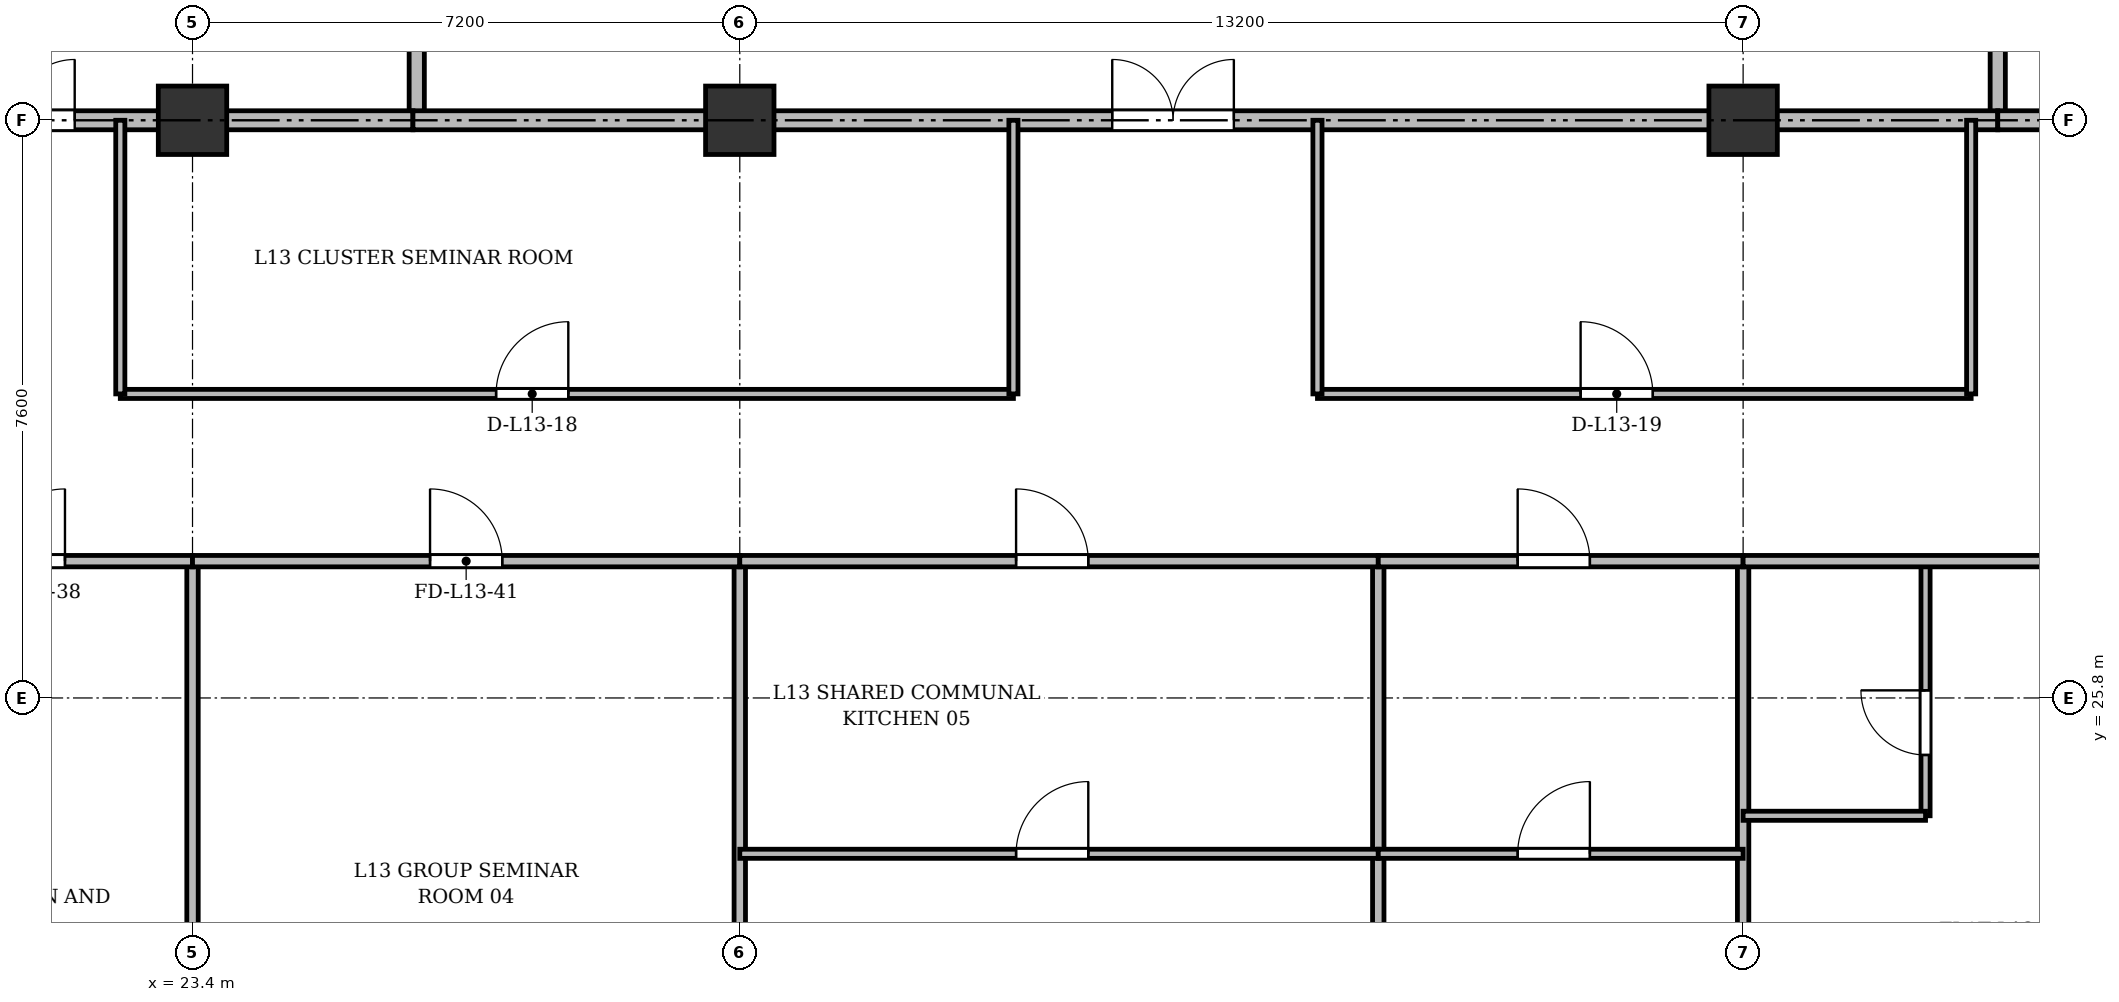
"""IFC4 building model, lengths in metres.
Left out: names, types, materials, properties, quantities, classifications, styles, units other than length and angle.
Written with IfcOpenShell. Run it as: python <this file> out.ifc"""

import sys

from ifc_helpers import new_model, si_unit, direction, frame, frame_2d, origin, origin_2d, place, context, subcontext, project, spatial, rectangle, extrude, source, transform, mapped, element, fill, save


model = new_model("IFC4")
c1 = context("Model", 3, precision=1e-05, world=origin(), true_north=direction((0.0, 1.0)))
c2 = subcontext(c1, "Body", "Model", "MODEL_VIEW")
j1 = project(units=[si_unit("LENGTHUNIT", "METRE"), si_unit("PLANEANGLEUNIT", "RADIAN")], contexts=[c1])
p1 = place(None, origin())
s1 = spatial("IfcSite", under=j1, at=p1, CompositionType="ELEMENT")
p2 = place(p1, origin())
s2 = spatial("IfcBuilding", under=s1, at=p2, CompositionType="ELEMENT")
p3 = place(p2, frame((0.0, 0.0, 52.3)))
s3 = spatial("IfcBuildingStorey", under=s2, at=p3, CompositionType="ELEMENT", Elevation=52.3)
m1 = source(origin(), c2, "Body", "SweptSolid", [
    extrude(rectangle(XDim=0.9, YDim=0.9, at=origin_2d()), origin(), (0.0, 0.0, 1.0), 3.6),
])
for number, where, z_axis, x_axis in (
    (1, (23.4, 33.4, 0.0), (0.0, 0.0, 1.0), (1.0, 0.0, 0.0)),
    (2, (30.6, 33.4, 0.0), (0.0, 0.0, 1.0), (1.0, 0.0, 0.0)),
    (3, (43.8, 33.4, 0.0), (0.0, 0.0, 1.0), (1.0, 0.0, 0.0)),
):
    element("IfcColumn", number, at=place(p3, frame(where, z_axis=z_axis, x_axis=x_axis)), inside=s3, PredefinedType="COLUMN", context=c2, shape_type="MappedRepresentation", body=[
        mapped(m1, transform((0.0, 0.0, 0.0), x_axis=(1.0, 0.0, 0.0), y_axis=(0.0, 1.0, 0.0), z_axis=(0.0, 0.0, 1.0), scale=1.0)),
    ])
p4 = place(p3, frame((26.35, 33.4, 0.0), z_axis=(0.0, 0.0, 1.0), x_axis=(0.0, 1.0, 0.0)))
e4 = element("IfcWall", 4, at=p4, inside=s3, PredefinedType="SOLIDWALL", context=c2, shape_type="SweptSolid", body=[
    extrude(rectangle(XDim=11.3, YDim=0.2, at=frame_2d((5.65, 0.0))), origin(), (0.0, 0.0, 1.0), 2.69),
])
p5 = place(p3, frame((19.5, 33.4, 0.0), z_axis=(0.0, 0.0, 1.0), x_axis=(1.0, 0.0, 0.0)))
e5 = element("IfcWall", 5, at=p5, inside=s3, PredefinedType="PARTITIONING", context=c2, shape_type="SweptSolid", body=[
    extrude(rectangle(XDim=6.8, YDim=0.25, at=frame_2d((3.4, 0.0))), origin(), (0.0, 0.0, 1.0), 2.69),
])
p6 = place(p5, frame((0.75, 0.0, 0.0)))
e6 = element("IfcOpeningElement", 6, at=p6, cuts=e5, PredefinedType="OPENING", context=c2, shape_type="SweptSolid", body=[
    extrude(rectangle(XDim=1.6, YDim=2.2, at=frame_2d((0.8, 1.1))), frame((0.0, 0.135, 0.0), z_axis=(0.0, -1.0, 0.0), x_axis=(1.0, 0.0, 0.0)), (0.0, 0.0, 1.0), 0.27),
])
p7 = place(p3, frame((47.15, 33.4, 0.0), z_axis=(0.0, 0.0, 1.0), x_axis=(0.0, 1.0, 0.0)))
e7 = element("IfcWall", 7, at=p7, inside=s3, PredefinedType="SOLIDWALL", context=c2, shape_type="SweptSolid", body=[
    extrude(rectangle(XDim=11.3, YDim=0.2, at=frame_2d((5.65, 0.0))), origin(), (0.0, 0.0, 1.0), 2.69),
])
p8 = place(p3, frame((26.3, 33.4, 0.0), z_axis=(0.0, 0.0, 1.0), x_axis=(1.0, 0.0, 0.0)))
e8 = element("IfcWall", 8, at=p8, inside=s3, PredefinedType="PARTITIONING", context=c2, shape_type="SweptSolid", body=[
    extrude(rectangle(XDim=20.85, YDim=0.25, at=frame_2d((10.425, 0.0))), origin(), (0.0, 0.0, 1.0), 2.69),
])
p9 = place(p8, frame((9.2, 0.0, 0.0)))
e9 = element("IfcOpeningElement", 9, at=p9, cuts=e8, PredefinedType="OPENING", context=c2, shape_type="SweptSolid", body=[
    extrude(rectangle(XDim=1.6, YDim=2.2, at=frame_2d((0.8, 1.1))), frame((0.0, 0.135, 0.0), z_axis=(0.0, -1.0, 0.0), x_axis=(1.0, 0.0, 0.0)), (0.0, 0.0, 1.0), 0.27),
])
p10 = place(p3, frame((47.15, 33.4, 0.0), z_axis=(0.0, 0.0, 1.0), x_axis=(1.0, 0.0, 0.0)))
e10 = element("IfcWall", 10, at=p10, inside=s3, PredefinedType="PARTITIONING", context=c2, shape_type="SweptSolid", body=[
    extrude(rectangle(XDim=11.15, YDim=0.25, at=frame_2d((5.575, 0.0))), origin(), (0.0, 0.0, 1.0), 2.69),
])
p11 = place(p10, frame((0.7, 0.0, 0.0)))
e11 = element("IfcOpeningElement", 11, at=p11, cuts=e10, PredefinedType="OPENING", context=c2, shape_type="SweptSolid", body=[
    extrude(rectangle(XDim=0.95, YDim=2.15, at=frame_2d((0.475, 1.075))), frame((0.0, 0.135, 0.0), z_axis=(0.0, -1.0, 0.0), x_axis=(1.0, 0.0, 0.0)), (0.0, 0.0, 1.0), 0.27),
])
p12 = place(p10, frame((6.0, 0.0, 0.0)))
e12 = element("IfcOpeningElement", 12, at=p12, cuts=e10, PredefinedType="OPENING", context=c2, shape_type="SweptSolid", body=[
    extrude(rectangle(XDim=1.2, YDim=2.15, at=frame_2d((0.6, 1.075))), frame((0.0, 0.135, 0.0), z_axis=(0.0, -1.0, 0.0), x_axis=(1.0, 0.0, 0.0)), (0.0, 0.0, 1.0), 0.27),
])
p13 = place(p3, frame((22.45, 29.8, 0.0), z_axis=(0.0, 0.0, 1.0), x_axis=(1.0, 0.0, 0.0)))
e13 = element("IfcWall", 13, at=p13, inside=s3, PredefinedType="PARTITIONING", context=c2, shape_type="SweptSolid", body=[
    extrude(rectangle(XDim=11.75, YDim=0.12, at=frame_2d((5.875, 0.0))), origin(), (0.0, 0.0, 1.0), 2.752),
])
p14 = place(p13, frame((4.944, 0.0, 0.0)))
e14 = element("IfcOpeningElement", 14, at=p14, cuts=e13, PredefinedType="OPENING", context=c2, shape_type="SweptSolid", body=[
    extrude(rectangle(XDim=0.95, YDim=2.15, at=frame_2d((0.475, 1.075))), frame((0.0, 0.07, 0.0), z_axis=(0.0, -1.0, 0.0), x_axis=(1.0, 0.0, 0.0)), (0.0, 0.0, 1.0), 0.14),
])
p15 = place(p3, frame((38.2, 29.8, 0.0), z_axis=(0.0, 0.0, 1.0), x_axis=(1.0, 0.0, 0.0)))
e15 = element("IfcWall", 15, at=p15, inside=s3, PredefinedType="PARTITIONING", context=c2, shape_type="SweptSolid", body=[
    extrude(rectangle(XDim=8.6, YDim=0.12, at=frame_2d((4.3, 0.0))), origin(), (0.0, 0.0, 1.0), 2.752),
])
p16 = place(p15, frame((3.462, 0.0, 0.0)))
e16 = element("IfcOpeningElement", 16, at=p16, cuts=e15, PredefinedType="OPENING", context=c2, shape_type="SweptSolid", body=[
    extrude(rectangle(XDim=0.95, YDim=2.15, at=frame_2d((0.475, 1.075))), frame((0.0, 0.07, 0.0), z_axis=(0.0, -1.0, 0.0), x_axis=(1.0, 0.0, 0.0)), (0.0, 0.0, 1.0), 0.14),
])
for number, where, z_axis, x_axis in (
    (17, (22.45, 29.8, 0.0), (0.0, 0.0, 1.0), (0.0, 1.0, 0.0)),
    (18, (34.2, 29.8, 0.0), (0.0, 0.0, 1.0), (0.0, 1.0, 0.0)),
    (19, (38.2, 29.8, 0.0), (0.0, 0.0, 1.0), (0.0, 1.0, 0.0)),
    (20, (46.8, 29.8, 0.0), (0.0, 0.0, 1.0), (0.0, 1.0, 0.0)),
):
    element("IfcWall", number, at=place(p3, frame(where, z_axis=z_axis, x_axis=x_axis)), inside=s3, PredefinedType="PARTITIONING", context=c2, shape_type="SweptSolid", body=[
        extrude(rectangle(XDim=3.6, YDim=0.12, at=frame_2d((1.8, 0.0))), origin(), (0.0, 0.0, 1.0), 2.69),
    ])
for number, where, z_axis, x_axis in (
    (21, (23.4, 3.145, 0.0), (0.0, 0.0, 1.0), (0.0, 1.0, 0.0)),
    (22, (30.6, 3.145, 0.0), (0.0, 0.0, 1.0), (0.0, 1.0, 0.0)),
):
    element("IfcWall", number, at=place(p3, frame(where, z_axis=z_axis, x_axis=x_axis)), inside=s3, PredefinedType="PARTITIONING", context=c2, shape_type="SweptSolid", body=[
        extrude(rectangle(XDim=24.455, YDim=0.15, at=frame_2d((12.228, 0.0))), origin(), (0.0, 0.0, 1.0), 2.752),
    ])
p17 = place(p3, frame((39.0, 3.145, 0.0), z_axis=(0.0, 0.0, 1.0), x_axis=(0.0, 1.0, 0.0)))
e23 = element("IfcWall", 23, at=p17, inside=s3, PredefinedType="PARTITIONING", context=c2, shape_type="SweptSolid", body=[
    extrude(rectangle(XDim=24.455, YDim=0.15, at=frame_2d((12.228, 0.0))), origin(), (0.0, 0.0, 1.0), 2.69),
])
p18 = place(p3, frame((43.8, 3.145, 0.0), z_axis=(0.0, 0.0, 1.0), x_axis=(0.0, 1.0, 0.0)))
e24 = element("IfcWall", 24, at=p18, inside=s3, PredefinedType="PARTITIONING", context=c2, shape_type="SweptSolid", body=[
    extrude(rectangle(XDim=24.455, YDim=0.15, at=frame_2d((12.228, 0.0))), origin(), (0.0, 0.0, 1.0), 2.752),
])
p19 = place(p3, frame((15.6, 27.6, 0.0), z_axis=(0.0, 0.0, 1.0), x_axis=(1.0, 0.0, 0.0)))
e25 = element("IfcWall", 25, at=p19, inside=s3, PredefinedType="PARTITIONING", context=c2, shape_type="SweptSolid", body=[
    extrude(rectangle(XDim=7.8, YDim=0.15, at=frame_2d((3.9, 0.0))), origin(), (0.0, 0.0, 1.0), 2.752),
])
p20 = place(p19, frame((5.172, 0.0, 0.0)))
e26 = element("IfcOpeningElement", 26, at=p20, cuts=e25, PredefinedType="OPENING", context=c2, shape_type="SweptSolid", body=[
    extrude(rectangle(XDim=0.95, YDim=2.15, at=frame_2d((0.475, 1.075))), frame((0.0, 0.085, 0.0), z_axis=(0.0, -1.0, 0.0), x_axis=(1.0, 0.0, 0.0)), (0.0, 0.0, 1.0), 0.17),
])
p21 = place(p3, frame((23.4, 27.6, 0.0), z_axis=(0.0, 0.0, 1.0), x_axis=(1.0, 0.0, 0.0)))
e27 = element("IfcWall", 27, at=p21, inside=s3, PredefinedType="PARTITIONING", context=c2, shape_type="SweptSolid", body=[
    extrude(rectangle(XDim=7.2, YDim=0.15, at=frame_2d((3.6, 0.0))), origin(), (0.0, 0.0, 1.0), 2.752),
])
p22 = place(p21, frame((3.125, 0.0, 0.0)))
e28 = element("IfcOpeningElement", 28, at=p22, cuts=e27, PredefinedType="OPENING", context=c2, shape_type="SweptSolid", body=[
    extrude(rectangle(XDim=0.95, YDim=2.15, at=frame_2d((0.475, 1.075))), frame((0.0, 0.085, 0.0), z_axis=(0.0, -1.0, 0.0), x_axis=(1.0, 0.0, 0.0)), (0.0, 0.0, 1.0), 0.17),
])
p23 = place(p3, frame((30.6, 27.6, 0.0), z_axis=(0.0, 0.0, 1.0), x_axis=(1.0, 0.0, 0.0)))
e29 = element("IfcWall", 29, at=p23, inside=s3, PredefinedType="PARTITIONING", context=c2, shape_type="SweptSolid", body=[
    extrude(rectangle(XDim=8.4, YDim=0.15, at=frame_2d((4.2, 0.0))), origin(), (0.0, 0.0, 1.0), 2.752),
])
p24 = place(p23, frame((3.635, 0.0, 0.0)))
e30 = element("IfcOpeningElement", 30, at=p24, cuts=e29, PredefinedType="OPENING", context=c2, shape_type="SweptSolid", body=[
    extrude(rectangle(XDim=0.95, YDim=2.15, at=frame_2d((0.475, 1.075))), frame((0.0, 0.085, 0.0), z_axis=(0.0, -1.0, 0.0), x_axis=(1.0, 0.0, 0.0)), (0.0, 0.0, 1.0), 0.17),
])
p25 = place(p3, frame((30.6, 23.75, 0.0), z_axis=(0.0, 0.0, 1.0), x_axis=(1.0, 0.0, 0.0)))
e31 = element("IfcWall", 31, at=p25, inside=s3, PredefinedType="PARTITIONING", context=c2, shape_type="SweptSolid", body=[
    extrude(rectangle(XDim=8.4, YDim=0.12, at=frame_2d((4.2, 0.0))), origin(), (0.0, 0.0, 1.0), 2.752),
])
p26 = place(p25, frame((3.635, 0.0, 0.0)))
e32 = element("IfcOpeningElement", 32, at=p26, cuts=e31, PredefinedType="OPENING", context=c2, shape_type="SweptSolid", body=[
    extrude(rectangle(XDim=0.95, YDim=2.15, at=frame_2d((0.475, 1.075))), frame((0.0, 0.07, 0.0), z_axis=(0.0, -1.0, 0.0), x_axis=(1.0, 0.0, 0.0)), (0.0, 0.0, 1.0), 0.14),
])
p27 = place(p3, frame((39.0, 27.6, 0.0), z_axis=(0.0, 0.0, 1.0), x_axis=(1.0, 0.0, 0.0)))
e33 = element("IfcWall", 33, at=p27, inside=s3, PredefinedType="PARTITIONING", context=c2, shape_type="SweptSolid", body=[
    extrude(rectangle(XDim=4.8, YDim=0.15, at=frame_2d((2.4, 0.0))), origin(), (0.0, 0.0, 1.0), 2.752),
])
p28 = place(p27, frame((1.834, 0.0, 0.0)))
e34 = element("IfcOpeningElement", 34, at=p28, cuts=e33, PredefinedType="OPENING", context=c2, shape_type="SweptSolid", body=[
    extrude(rectangle(XDim=0.95, YDim=2.15, at=frame_2d((0.475, 1.075))), frame((0.0, 0.085, 0.0), z_axis=(0.0, -1.0, 0.0), x_axis=(1.0, 0.0, 0.0)), (0.0, 0.0, 1.0), 0.17),
])
p29 = place(p3, frame((39.0, 23.75, 0.0), z_axis=(0.0, 0.0, 1.0), x_axis=(1.0, 0.0, 0.0)))
e35 = element("IfcWall", 35, at=p29, inside=s3, PredefinedType="PARTITIONING", context=c2, shape_type="SweptSolid", body=[
    extrude(rectangle(XDim=4.8, YDim=0.12, at=frame_2d((2.4, 0.0))), origin(), (0.0, 0.0, 1.0), 2.752),
])
p30 = place(p29, frame((1.834, 0.0, 0.0)))
e36 = element("IfcOpeningElement", 36, at=p30, cuts=e35, PredefinedType="OPENING", context=c2, shape_type="SweptSolid", body=[
    extrude(rectangle(XDim=0.95, YDim=2.15, at=frame_2d((0.475, 1.075))), frame((0.0, 0.07, 0.0), z_axis=(0.0, -1.0, 0.0), x_axis=(1.0, 0.0, 0.0)), (0.0, 0.0, 1.0), 0.14),
])
p31 = place(p3, frame((46.2, 24.25, 0.0), z_axis=(0.0, 0.0, 1.0), x_axis=(0.0, 1.0, 0.0)))
e37 = element("IfcWall", 37, at=p31, inside=s3, PredefinedType="PARTITIONING", context=c2, shape_type="SweptSolid", body=[
    extrude(rectangle(XDim=3.35, YDim=0.12, at=frame_2d((1.675, 0.0))), origin(), (0.0, 0.0, 1.0), 2.94),
])
p32 = place(p31, frame((0.8, 0.0, 0.0)))
e38 = element("IfcOpeningElement", 38, at=p32, cuts=e37, PredefinedType="OPENING", context=c2, shape_type="SweptSolid", body=[
    extrude(rectangle(XDim=0.85, YDim=2.1, at=frame_2d((0.425, 1.05))), frame((0.0, 0.07, 0.0), z_axis=(0.0, -1.0, 0.0), x_axis=(1.0, 0.0, 0.0)), (0.0, 0.0, 1.0), 0.14),
])
p33 = place(p3, frame((43.8, 24.25, 0.0), z_axis=(0.0, 0.0, 1.0), x_axis=(1.0, 0.0, 0.0)))
e39 = element("IfcWall", 39, at=p33, inside=s3, PredefinedType="PARTITIONING", context=c2, shape_type="SweptSolid", body=[
    extrude(rectangle(XDim=2.4, YDim=0.12, at=frame_2d((1.2, 0.0))), origin(), (0.0, 0.0, 1.0), 2.752),
])
p34 = place(p3, frame((43.8, 27.6, 0.0), z_axis=(0.0, 0.0, 1.0), x_axis=(1.0, 0.0, 0.0)))
e40 = element("IfcWall", 40, at=p34, inside=s3, PredefinedType="PARTITIONING", context=c2, shape_type="SweptSolid", body=[
    extrude(rectangle(XDim=7.2, YDim=0.15, at=frame_2d((3.6, 0.0))), origin(), (0.0, 0.0, 1.0), 2.752),
])
p35 = place(p34, frame((4.706, 0.0, 0.0)))
e41 = element("IfcOpeningElement", 41, at=p35, cuts=e40, PredefinedType="OPENING", context=c2, shape_type="SweptSolid", body=[
    extrude(rectangle(XDim=0.95, YDim=2.15, at=frame_2d((0.475, 1.075))), frame((0.0, 0.085, 0.0), z_axis=(0.0, -1.0, 0.0), x_axis=(1.0, 0.0, 0.0)), (0.0, 0.0, 1.0), 0.17),
])
m2 = source(origin(), c2, "Body", "SweptSolid", [
    extrude(rectangle(XDim=1.6, YDim=2.2, at=frame_2d((0.8, 1.1))), frame((0.0, 0.025, 0.0), z_axis=(0.0, -1.0, 0.0), x_axis=(1.0, 0.0, 0.0)), (0.0, 0.0, 1.0), 0.05),
])
p36 = place(p6, origin())
e42 = element("IfcDoor", 42, at=p36, inside=s3, OperationType="DOUBLE_DOOR_SINGLE_SWING", PredefinedType="DOOR", context=c2, shape_type="MappedRepresentation", body=[
    mapped(m2, transform((0.0, 0.0, 0.0), x_axis=(1.0, 0.0, 0.0), y_axis=(0.0, 1.0, 0.0), z_axis=(0.0, 0.0, 1.0), scale=1.0)),
])
fill(e6, e42)
p37 = place(p9, origin())
e43 = element("IfcDoor", 43, at=p37, inside=s3, OperationType="DOUBLE_DOOR_SINGLE_SWING", PredefinedType="DOOR", context=c2, shape_type="MappedRepresentation", body=[
    mapped(m2, transform((0.0, 0.0, 0.0), x_axis=(1.0, 0.0, 0.0), y_axis=(0.0, 1.0, 0.0), z_axis=(0.0, 0.0, 1.0), scale=1.0)),
])
fill(e9, e43)
m3 = source(origin(), c2, "Body", "SweptSolid", [
    extrude(rectangle(XDim=0.95, YDim=2.15, at=frame_2d((0.475, 1.075))), frame((0.0, 0.025, 0.0), z_axis=(0.0, -1.0, 0.0), x_axis=(1.0, 0.0, 0.0)), (0.0, 0.0, 1.0), 0.05),
])
p38 = place(p14, origin())
e44 = element("IfcDoor", 44, at=p38, inside=s3, OperationType="SINGLE_SWING_RIGHT", PredefinedType="DOOR", context=c2, shape_type="MappedRepresentation", body=[
    mapped(m3, transform((0.0, 0.0, 0.0), x_axis=(1.0, 0.0, 0.0), y_axis=(0.0, 1.0, 0.0), z_axis=(0.0, 0.0, 1.0), scale=1.0)),
])
fill(e14, e44)
p39 = place(p16, origin())
e45 = element("IfcDoor", 45, at=p39, inside=s3, OperationType="SINGLE_SWING_LEFT", PredefinedType="DOOR", context=c2, shape_type="MappedRepresentation", body=[
    mapped(m3, transform((0.0, 0.0, 0.0), x_axis=(1.0, 0.0, 0.0), y_axis=(0.0, 1.0, 0.0), z_axis=(0.0, 0.0, 1.0), scale=1.0)),
])
fill(e16, e45)
p40 = place(p20, origin())
e46 = element("IfcDoor", 46, at=p40, inside=s3, OperationType="SINGLE_SWING_RIGHT", PredefinedType="DOOR", context=c2, shape_type="MappedRepresentation", body=[
    mapped(m3, transform((0.0, 0.0, 0.0), x_axis=(1.0, 0.0, 0.0), y_axis=(0.0, 1.0, 0.0), z_axis=(0.0, 0.0, 1.0), scale=1.0)),
])
fill(e26, e46)
p41 = place(p22, origin())
e47 = element("IfcDoor", 47, at=p41, inside=s3, OperationType="SINGLE_SWING_LEFT", PredefinedType="DOOR", context=c2, shape_type="MappedRepresentation", body=[
    mapped(m3, transform((0.0, 0.0, 0.0), x_axis=(1.0, 0.0, 0.0), y_axis=(0.0, 1.0, 0.0), z_axis=(0.0, 0.0, 1.0), scale=1.0)),
])
fill(e28, e47)
p42 = place(p24, origin())
e48 = element("IfcDoor", 48, at=p42, inside=s3, OperationType="SINGLE_SWING_LEFT", PredefinedType="DOOR", context=c2, shape_type="MappedRepresentation", body=[
    mapped(m3, transform((0.0, 0.0, 0.0), x_axis=(1.0, 0.0, 0.0), y_axis=(0.0, 1.0, 0.0), z_axis=(0.0, 0.0, 1.0), scale=1.0)),
])
fill(e30, e48)
p43 = place(p26, origin())
e49 = element("IfcDoor", 49, at=p43, inside=s3, OperationType="SINGLE_SWING_RIGHT", PredefinedType="DOOR", context=c2, shape_type="MappedRepresentation", body=[
    mapped(m3, transform((0.0, 0.0, 0.0), x_axis=(1.0, 0.0, 0.0), y_axis=(0.0, 1.0, 0.0), z_axis=(0.0, 0.0, 1.0), scale=1.0)),
])
fill(e32, e49)
p44 = place(p28, origin())
e50 = element("IfcDoor", 50, at=p44, inside=s3, OperationType="SINGLE_SWING_LEFT", PredefinedType="DOOR", context=c2, shape_type="MappedRepresentation", body=[
    mapped(m3, transform((0.0, 0.0, 0.0), x_axis=(1.0, 0.0, 0.0), y_axis=(0.0, 1.0, 0.0), z_axis=(0.0, 0.0, 1.0), scale=1.0)),
])
fill(e34, e50)
p45 = place(p30, origin())
e51 = element("IfcDoor", 51, at=p45, inside=s3, OperationType="SINGLE_SWING_RIGHT", PredefinedType="DOOR", context=c2, shape_type="MappedRepresentation", body=[
    mapped(m3, transform((0.0, 0.0, 0.0), x_axis=(1.0, 0.0, 0.0), y_axis=(0.0, 1.0, 0.0), z_axis=(0.0, 0.0, 1.0), scale=1.0)),
])
fill(e36, e51)
m4 = source(origin(), c2, "Body", "SweptSolid", [
    extrude(rectangle(XDim=0.85, YDim=2.1, at=frame_2d((0.425, 1.05))), frame((0.0, 0.025, 0.0), z_axis=(0.0, -1.0, 0.0), x_axis=(1.0, 0.0, 0.0)), (0.0, 0.0, 1.0), 0.05),
])
p46 = place(p32, origin())
e52 = element("IfcDoor", 52, at=p46, inside=s3, OperationType="SINGLE_SWING_RIGHT", PredefinedType="DOOR", context=c2, shape_type="MappedRepresentation", body=[
    mapped(m4, transform((0.0, 0.0, 0.0), x_axis=(1.0, 0.0, 0.0), y_axis=(0.0, 1.0, 0.0), z_axis=(0.0, 0.0, 1.0), scale=1.0)),
])
fill(e38, e52)
save(model, sys.argv[1])
